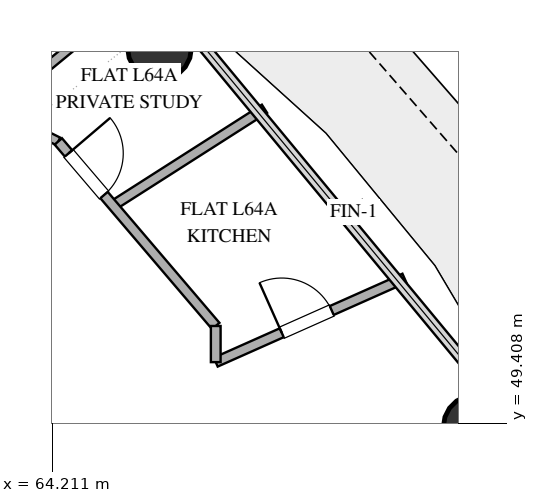
"""IFC4 building model, lengths in metres.
Left out: names, types, materials, properties, quantities, classifications, styles, units other than length and angle.
Written with IfcOpenShell. Run it as: python <this file> out.ifc"""

import sys

from ifc_helpers import new_model, si_unit, direction, frame, frame_2d, origin, origin_2d, place, context, subcontext, project, spatial, rectangle, hollow_circle, extrude, element, fill, save


model = new_model("IFC4")
c1 = context("Model", 3, precision=1e-05, world=origin(), true_north=direction((0.0, 1.0)))
c2 = subcontext(c1, "Body", "Model", "MODEL_VIEW")
j1 = project(units=[si_unit("LENGTHUNIT", "METRE"), si_unit("PLANEANGLEUNIT", "RADIAN")], contexts=[c1])
p1 = place(None, origin())
s1 = spatial("IfcSite", under=j1, at=p1, CompositionType="ELEMENT")
p2 = place(p1, origin())
s2 = spatial("IfcBuilding", under=s1, at=p2, CompositionType="ELEMENT")
p3 = place(p2, frame((0.0, 0.0, 249.6)))
s3 = spatial("IfcBuildingStorey", under=s2, at=p3, CompositionType="ELEMENT", Elevation=249.6)
for number, where, z_axis, x_axis in (
    (1, (71.169, 49.347, 0.0), (0.0, 0.0, 1.0), (1.0, 0.0, 0.0)),
    (2, (65.975, 55.576, 0.0), (0.0, 0.0, 1.0), (1.0, 0.0, 0.0)),
):
    element("IfcColumn", number, at=place(p3, frame(where, z_axis=z_axis, x_axis=x_axis)), inside=s3, PredefinedType="COLUMN", context=c2, shape_type="SweptSolid", body=[
        extrude(hollow_circle(Radius=0.525, WallThickness=0.028, at=origin_2d()), origin(), (0.0, 0.0, 1.0), 3.36),
    ])
p4 = place(p3, frame((58.964, 56.7, 0.0), z_axis=(0.0, 0.0, 1.0), x_axis=(0.895471406875, -0.445119039661, 0.0)))
e3 = element("IfcWall", 3, at=p4, inside=s3, PredefinedType="PARTITIONING", context=c2, shape_type="SweptSolid", body=[
    extrude(rectangle(XDim=5.971, YDim=0.14, at=frame_2d((2.986, 0.0))), origin(), (0.0, 0.0, 1.0), 2.72),
])
p5 = place(p4, frame((2.616, 0.0, 0.0)))
e4 = element("IfcOpeningElement", 4, at=p5, cuts=e3, PredefinedType="OPENING", context=c2, shape_type="SweptSolid", body=[
    extrude(rectangle(XDim=0.9, YDim=2.1, at=frame_2d((0.45, 1.05))), frame((0.0, 0.08, 0.0), z_axis=(0.0, -1.0, 0.0), x_axis=(1.0, 0.0, 0.0)), (0.0, 0.0, 1.0), 0.16),
])
p6 = place(p3, frame((66.9, 50.412, 0.0), z_axis=(0.0, 0.0, 1.0), x_axis=(0.91359503784, 0.406625265858, 0.0)))
e5 = element("IfcWall", 5, at=p6, inside=s3, PredefinedType="PLUMBINGWALL", context=c2, shape_type="SweptSolid", body=[
    extrude(rectangle(XDim=3.396, YDim=0.16, at=frame_2d((1.698, 0.0))), origin(), (0.0, 0.0, 1.0), 2.72),
])
p7 = place(p6, frame((1.188, 0.0, 0.0)))
e6 = element("IfcOpeningElement", 6, at=p7, cuts=e5, PredefinedType="OPENING", context=c2, shape_type="SweptSolid", body=[
    extrude(rectangle(XDim=0.9, YDim=2.1, at=frame_2d((0.45, 1.05))), frame((0.0, 0.09, 0.0), z_axis=(0.0, -1.0, 0.0), x_axis=(1.0, 0.0, 0.0)), (0.0, 0.0, 1.0), 0.18),
])
p8 = place(p3, frame((65.622, 56.5, 0.0), z_axis=(0.0, 0.0, 1.0), x_axis=(-0.772175042734, -0.635409870381, 0.0)))
e7 = element("IfcWall", 7, at=p8, inside=s3, PredefinedType="PARTITIONING", context=c2, shape_type="SweptSolid", body=[
    extrude(rectangle(XDim=3.051, YDim=0.15, at=frame_2d((1.525, 0.0))), origin(), (0.0, 0.0, 1.0), 2.72),
])
p9 = place(p3, frame((65.21, 52.988, 0.0), z_axis=(0.0, 0.0, 1.0), x_axis=(0.842827369803, 0.538184006369, 0.0)))
e8 = element("IfcWall", 8, at=p9, inside=s3, PredefinedType="PLUMBINGWALL", context=c2, shape_type="SweptSolid", body=[
    extrude(rectangle(XDim=2.956, YDim=0.16, at=frame_2d((1.478, 0.0))), origin(), (0.0, 0.0, 1.0), 2.72),
])
p10 = place(p3, frame((64.311, 54.042, 0.0), z_axis=(0.0, 0.0, 1.0), x_axis=(0.648985159088, -0.760801066826, 0.0)))
e9 = element("IfcWall", 9, at=p10, inside=s3, PredefinedType="PLUMBINGWALL", context=c2, shape_type="SweptSolid", body=[
    extrude(rectangle(XDim=3.989, YDim=0.16, at=frame_2d((1.995, 0.0))), origin(), (0.0, 0.0, 1.0), 2.72),
])
p11 = place(p10, frame((0.259, 0.0, 0.0)))
e10 = element("IfcOpeningElement", 10, at=p11, cuts=e9, PredefinedType="OPENING", context=c2, shape_type="SweptSolid", body=[
    extrude(rectangle(XDim=0.9, YDim=2.1, at=frame_2d((0.45, 1.05))), frame((0.0, 0.09, 0.0), z_axis=(0.0, -1.0, 0.0), x_axis=(1.0, 0.0, 0.0)), (0.0, 0.0, 1.0), 0.18),
])
p12 = place(p3, frame((66.9, 51.007, 0.0), z_axis=(0.0, 0.0, 1.0), x_axis=(0.0, -1.0, 0.0)))
e11 = element("IfcWall", 11, at=p12, inside=s3, PredefinedType="PLUMBINGWALL", context=c2, shape_type="SweptSolid", body=[
    extrude(rectangle(XDim=0.595, YDim=0.16, at=frame_2d((0.297, 0.0))), origin(), (0.0, 0.0, 1.0), 2.72),
])
p13 = place(p7, origin())
e12 = element("IfcDoor", 12, at=p13, inside=s3, OperationType="SINGLE_SWING_LEFT", PredefinedType="DOOR", context=c2, shape_type="SweptSolid", body=[
    extrude(rectangle(XDim=0.9, YDim=2.1, at=frame_2d((0.45, 1.05))), frame((0.0, 0.025, 0.0), z_axis=(0.0, -1.0, 0.0), x_axis=(1.0, 0.0, 0.0)), (0.0, 0.0, 1.0), 0.05),
])
fill(e6, e12)
p14 = place(p11, origin())
e13 = element("IfcDoor", 13, at=p14, inside=s3, OperationType="SINGLE_SWING_LEFT", PredefinedType="DOOR", context=c2, shape_type="SweptSolid", body=[
    extrude(rectangle(XDim=0.9, YDim=2.1, at=frame_2d((0.45, 1.05))), frame((0.0, 0.025, 0.0), z_axis=(0.0, -1.0, 0.0), x_axis=(1.0, 0.0, 0.0)), (0.0, 0.0, 1.0), 0.05),
])
fill(e10, e13)
save(model, sys.argv[1])
